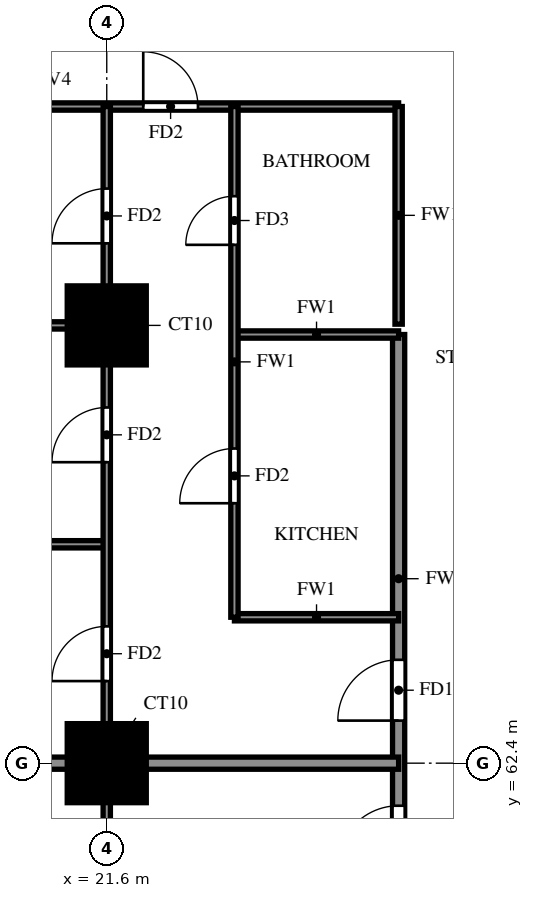
"""IFC4 building model, lengths in metres.
Left out: names, types, materials, properties, quantities, classifications, styles, units other than length and angle.
Written with IfcOpenShell. Run it as: python <this file> out.ifc"""

import sys

from ifc_helpers import new_model, si_unit, direction, frame, frame_2d, origin, origin_2d, place, context, subcontext, project, spatial, rectangle, extrude, source, transform, mapped, element, fill, save


model = new_model("IFC4")
c1 = context("Model", 3, precision=1e-05, world=origin(), true_north=direction((0.0, 1.0)))
c2 = subcontext(c1, "Body", "Model", "MODEL_VIEW")
j1 = project(units=[si_unit("LENGTHUNIT", "METRE"), si_unit("PLANEANGLEUNIT", "RADIAN")], contexts=[c1])
p1 = place(None, origin())
s1 = spatial("IfcSite", under=j1, at=p1, CompositionType="ELEMENT")
p2 = place(p1, origin())
s2 = spatial("IfcBuilding", under=s1, at=p2, CompositionType="ELEMENT")
p3 = place(p2, frame((0.0, 0.0, 79.5)))
s3 = spatial("IfcBuildingStorey", under=s2, at=p3, CompositionType="ELEMENT", Elevation=79.5)
m1 = source(origin(), c2, "Body", "SweptSolid", [
    extrude(rectangle(XDim=1.3, YDim=1.3, at=origin_2d()), origin(), (0.0, 0.0, 1.0), 3.18),
])
for number, where, z_axis, x_axis in (
    (1, (21.6, 62.4, 0.0), (0.0, 0.0, 1.0), (1.0, 0.0, 0.0)),
    (2, (21.6, 69.6, 0.0), (0.0, 0.0, 1.0), (1.0, 0.0, 0.0)),
):
    element("IfcColumn", number, at=place(p3, frame(where, z_axis=z_axis, x_axis=x_axis)), inside=s3, PredefinedType="COLUMN", context=c2, shape_type="MappedRepresentation", body=[
        mapped(m1, transform((0.0, 0.0, 0.0))),
    ])
p4 = place(p3, frame((26.4, 60.0, 0.0), z_axis=(0.0, 0.0, 1.0), x_axis=(0.0, 1.0, 0.0)))
e3 = element("IfcWall", 3, at=p4, inside=s3, PredefinedType="SOLIDWALL", context=c2, shape_type="SweptSolid", body=[
    extrude(rectangle(XDim=9.45, YDim=0.2, at=frame_2d((4.725, 0.0))), origin(), (0.0, 0.0, 1.0), 3.18),
])
p5 = place(p4, frame((0.7, 0.0, 0.0)))
e4 = element("IfcOpeningElement", 4, at=p5, cuts=e3, PredefinedType="OPENING", context=c2, shape_type="SweptSolid", body=[
    extrude(rectangle(XDim=1.0, YDim=2.1, at=frame_2d((0.5, 1.05))), frame((0.0, 0.11, 0.0), z_axis=(0.0, -1.0, 0.0), x_axis=(1.0, 0.0, 0.0)), (0.0, 0.0, 1.0), 0.22),
])
p6 = place(p4, frame((3.1, 0.0, 0.0)))
e5 = element("IfcOpeningElement", 5, at=p6, cuts=e3, PredefinedType="OPENING", context=c2, shape_type="SweptSolid", body=[
    extrude(rectangle(XDim=1.0, YDim=2.1, at=frame_2d((0.5, 1.05))), frame((0.0, 0.11, 0.0), z_axis=(0.0, -1.0, 0.0), x_axis=(1.0, 0.0, 0.0)), (0.0, 0.0, 1.0), 0.22),
])
p7 = place(p3, frame((14.525, 62.4, 0.0), z_axis=(0.0, 0.0, 1.0), x_axis=(1.0, 0.0, 0.0)))
e6 = element("IfcWall", 6, at=p7, inside=s3, PredefinedType="SOLIDWALL", context=c2, shape_type="SweptSolid", body=[
    extrude(rectangle(XDim=11.875, YDim=0.2, at=frame_2d((5.938, 0.0))), origin(), (0.0, 0.0, 1.0), 3.18),
])
p8 = place(p3, frame((23.7, 64.8, 0.0), z_axis=(0.0, 0.0, 1.0), x_axis=(1.0, 0.0, 0.0)))
e7 = element("IfcWall", 7, at=p8, inside=s3, PredefinedType="PARTITIONING", context=c2, shape_type="SweptSolid", body=[
    extrude(rectangle(XDim=2.7, YDim=0.12, at=frame_2d((1.35, 0.0))), origin(), (0.0, 0.0, 1.0), 3.18),
])
p9 = place(p3, frame((14.525, 66.0, 0.0), z_axis=(0.0, 0.0, 1.0), x_axis=(1.0, 0.0, 0.0)))
e8 = element("IfcWall", 8, at=p9, inside=s3, PredefinedType="PARTITIONING", context=c2, shape_type="SweptSolid", body=[
    extrude(rectangle(XDim=7.075, YDim=0.12, at=frame_2d((3.538, 0.0))), origin(), (0.0, 0.0, 1.0), 2.28),
])
p10 = place(p3, frame((23.7, 69.45, 0.0), z_axis=(0.0, 0.0, 1.0), x_axis=(1.0, 0.0, 0.0)))
e9 = element("IfcWall", 9, at=p10, inside=s3, PredefinedType="PARTITIONING", context=c2, shape_type="SweptSolid", body=[
    extrude(rectangle(XDim=2.7, YDim=0.12, at=frame_2d((1.35, 0.0))), origin(), (0.0, 0.0, 1.0), 3.18),
])
p11 = place(p3, frame((14.525, 69.6, 0.0), z_axis=(0.0, 0.0, 1.0), x_axis=(1.0, 0.0, 0.0)))
e10 = element("IfcWall", 10, at=p11, inside=s3, PredefinedType="PARTITIONING", context=c2, shape_type="SweptSolid", body=[
    extrude(rectangle(XDim=7.075, YDim=0.12, at=frame_2d((3.538, 0.0))), origin(), (0.0, 0.0, 1.0), 3.18),
])
p12 = place(p3, frame((14.525, 73.2, 0.0), z_axis=(0.0, 0.0, 1.0), x_axis=(1.0, 0.0, 0.0)))
e11 = element("IfcWall", 11, at=p12, inside=s3, PredefinedType="PARTITIONING", context=c2, shape_type="SweptSolid", body=[
    extrude(rectangle(XDim=11.875, YDim=0.12, at=frame_2d((5.938, 0.0))), origin(), (0.0, 0.0, 1.0), 2.28),
])
p13 = place(p12, frame((7.675, 0.0, 0.0)))
e12 = element("IfcOpeningElement", 12, at=p13, cuts=e11, PredefinedType="OPENING", context=c2, shape_type="SweptSolid", body=[
    extrude(rectangle(XDim=0.9, YDim=2.1, at=frame_2d((0.45, 1.05))), frame((0.0, 0.07, 0.0), z_axis=(0.0, -1.0, 0.0), x_axis=(1.0, 0.0, 0.0)), (0.0, 0.0, 1.0), 0.14),
])
p14 = place(p3, frame((21.6, 33.725, 0.0), z_axis=(0.0, 0.0, 1.0), x_axis=(0.0, 1.0, 0.0)))
e13 = element("IfcWall", 13, at=p14, inside=s3, PredefinedType="PARTITIONING", context=c2, shape_type="SweptSolid", body=[
    extrude(rectangle(XDim=39.475, YDim=0.12, at=frame_2d((19.737, 0.0))), origin(), (0.0, 0.0, 1.0), 3.18),
])
p15 = place(p14, frame((7.775, 0.0, 0.0)))
e14 = element("IfcOpeningElement", 14, at=p15, cuts=e13, PredefinedType="OPENING", context=c2, shape_type="SweptSolid", body=[
    extrude(rectangle(XDim=0.9, YDim=2.1, at=frame_2d((0.45, 1.05))), frame((0.0, 0.07, 0.0), z_axis=(0.0, -1.0, 0.0), x_axis=(1.0, 0.0, 0.0)), (0.0, 0.0, 1.0), 0.14),
])
p16 = place(p14, frame((17.125, 0.0, 0.0)))
e15 = element("IfcOpeningElement", 15, at=p16, cuts=e13, PredefinedType="OPENING", context=c2, shape_type="SweptSolid", body=[
    extrude(rectangle(XDim=1.5, YDim=2.1, at=frame_2d((0.75, 1.05))), frame((0.0, 0.07, 0.0), z_axis=(0.0, -1.0, 0.0), x_axis=(1.0, 0.0, 0.0)), (0.0, 0.0, 1.0), 0.14),
])
p17 = place(p14, frame((22.825, 0.0, 0.0)))
e16 = element("IfcOpeningElement", 16, at=p17, cuts=e13, PredefinedType="OPENING", context=c2, shape_type="SweptSolid", body=[
    extrude(rectangle(XDim=0.9, YDim=2.1, at=frame_2d((0.45, 1.05))), frame((0.0, 0.07, 0.0), z_axis=(0.0, -1.0, 0.0), x_axis=(1.0, 0.0, 0.0)), (0.0, 0.0, 1.0), 0.14),
])
p18 = place(p14, frame((26.425, 0.0, 0.0)))
e17 = element("IfcOpeningElement", 17, at=p18, cuts=e13, PredefinedType="OPENING", context=c2, shape_type="SweptSolid", body=[
    extrude(rectangle(XDim=0.9, YDim=2.1, at=frame_2d((0.45, 1.05))), frame((0.0, 0.07, 0.0), z_axis=(0.0, -1.0, 0.0), x_axis=(1.0, 0.0, 0.0)), (0.0, 0.0, 1.0), 0.14),
])
p19 = place(p14, frame((30.025, 0.0, 0.0)))
e18 = element("IfcOpeningElement", 18, at=p19, cuts=e13, PredefinedType="OPENING", context=c2, shape_type="SweptSolid", body=[
    extrude(rectangle(XDim=0.9, YDim=2.1, at=frame_2d((0.45, 1.05))), frame((0.0, 0.07, 0.0), z_axis=(0.0, -1.0, 0.0), x_axis=(1.0, 0.0, 0.0)), (0.0, 0.0, 1.0), 0.14),
])
p20 = place(p14, frame((33.625, 0.0, 0.0)))
e19 = element("IfcOpeningElement", 19, at=p20, cuts=e13, PredefinedType="OPENING", context=c2, shape_type="SweptSolid", body=[
    extrude(rectangle(XDim=0.9, YDim=2.1, at=frame_2d((0.45, 1.05))), frame((0.0, 0.07, 0.0), z_axis=(0.0, -1.0, 0.0), x_axis=(1.0, 0.0, 0.0)), (0.0, 0.0, 1.0), 0.14),
])
p21 = place(p14, frame((37.225, 0.0, 0.0)))
e20 = element("IfcOpeningElement", 20, at=p21, cuts=e13, PredefinedType="OPENING", context=c2, shape_type="SweptSolid", body=[
    extrude(rectangle(XDim=0.9, YDim=2.1, at=frame_2d((0.45, 1.05))), frame((0.0, 0.07, 0.0), z_axis=(0.0, -1.0, 0.0), x_axis=(1.0, 0.0, 0.0)), (0.0, 0.0, 1.0), 0.14),
])
p22 = place(p3, frame((23.7, 64.8, 0.0), z_axis=(0.0, 0.0, 1.0), x_axis=(0.0, 1.0, 0.0)))
e21 = element("IfcWall", 21, at=p22, inside=s3, PredefinedType="PARTITIONING", context=c2, shape_type="SweptSolid", body=[
    extrude(rectangle(XDim=8.4, YDim=0.12, at=frame_2d((4.2, 0.0))), origin(), (0.0, 0.0, 1.0), 3.18),
])
p23 = place(p22, frame((1.875, 0.0, 0.0)))
e22 = element("IfcOpeningElement", 22, at=p23, cuts=e21, PredefinedType="OPENING", context=c2, shape_type="SweptSolid", body=[
    extrude(rectangle(XDim=0.9, YDim=2.1, at=frame_2d((0.45, 1.05))), frame((0.0, 0.07, 0.0), z_axis=(0.0, -1.0, 0.0), x_axis=(1.0, 0.0, 0.0)), (0.0, 0.0, 1.0), 0.14),
])
p24 = place(p22, frame((6.125, 0.0, 0.0)))
e23 = element("IfcOpeningElement", 23, at=p24, cuts=e21, PredefinedType="OPENING", context=c2, shape_type="SweptSolid", body=[
    extrude(rectangle(XDim=0.8, YDim=2.1, at=frame_2d((0.4, 1.05))), frame((0.0, 0.07, 0.0), z_axis=(0.0, -1.0, 0.0), x_axis=(1.0, 0.0, 0.0)), (0.0, 0.0, 1.0), 0.14),
])
p25 = place(p3, frame((26.4, 69.62, 0.0), z_axis=(0.0, 0.0, 1.0), x_axis=(0.0, 1.0, 0.0)))
e24 = element("IfcWall", 24, at=p25, inside=s3, PredefinedType="PARTITIONING", context=c2, shape_type="SweptSolid", body=[
    extrude(rectangle(XDim=3.58, YDim=0.12, at=frame_2d((1.79, 0.0))), origin(), (0.0, 0.0, 1.0), 3.18),
])
p26 = place(p5, origin())
e25 = element("IfcDoor", 25, at=p26, inside=s3, OperationType="SINGLE_SWING_LEFT", PredefinedType="DOOR", context=c2, shape_type="SweptSolid", body=[
    extrude(rectangle(XDim=1.0, YDim=2.1, at=frame_2d((0.5, 1.05))), frame((0.0, 0.025, 0.0), z_axis=(0.0, -1.0, 0.0), x_axis=(1.0, 0.0, 0.0)), (0.0, 0.0, 1.0), 0.05),
])
fill(e4, e25)
p27 = place(p6, origin())
e26 = element("IfcDoor", 26, at=p27, inside=s3, OperationType="SINGLE_SWING_RIGHT", PredefinedType="DOOR", context=c2, shape_type="SweptSolid", body=[
    extrude(rectangle(XDim=1.0, YDim=2.1, at=frame_2d((0.5, 1.05))), frame((0.0, 0.025, 0.0), z_axis=(0.0, -1.0, 0.0), x_axis=(1.0, 0.0, 0.0)), (0.0, 0.0, 1.0), 0.05),
])
fill(e5, e26)
p28 = place(p19, origin())
e27 = element("IfcDoor", 27, at=p28, inside=s3, OperationType="SINGLE_SWING_LEFT", PredefinedType="DOOR", context=c2, shape_type="SweptSolid", body=[
    extrude(rectangle(XDim=0.9, YDim=2.1, at=frame_2d((0.45, 1.05))), frame((0.0, 0.025, 0.0), z_axis=(0.0, -1.0, 0.0), x_axis=(1.0, 0.0, 0.0)), (0.0, 0.0, 1.0), 0.05),
])
fill(e18, e27)
p29 = place(p20, origin())
e28 = element("IfcDoor", 28, at=p29, inside=s3, OperationType="SINGLE_SWING_LEFT", PredefinedType="DOOR", context=c2, shape_type="SweptSolid", body=[
    extrude(rectangle(XDim=0.9, YDim=2.1, at=frame_2d((0.45, 1.05))), frame((0.0, 0.025, 0.0), z_axis=(0.0, -1.0, 0.0), x_axis=(1.0, 0.0, 0.0)), (0.0, 0.0, 1.0), 0.05),
])
fill(e19, e28)
p30 = place(p21, origin())
e29 = element("IfcDoor", 29, at=p30, inside=s3, OperationType="SINGLE_SWING_RIGHT", PredefinedType="DOOR", context=c2, shape_type="SweptSolid", body=[
    extrude(rectangle(XDim=0.9, YDim=2.1, at=frame_2d((0.45, 1.05))), frame((0.0, 0.025, 0.0), z_axis=(0.0, -1.0, 0.0), x_axis=(1.0, 0.0, 0.0)), (0.0, 0.0, 1.0), 0.05),
])
fill(e20, e29)
p31 = place(p13, origin())
e30 = element("IfcDoor", 30, at=p31, inside=s3, OperationType="SINGLE_SWING_LEFT", PredefinedType="DOOR", context=c2, shape_type="SweptSolid", body=[
    extrude(rectangle(XDim=0.9, YDim=2.1, at=frame_2d((0.45, 1.05))), frame((0.0, 0.025, 0.0), z_axis=(0.0, -1.0, 0.0), x_axis=(1.0, 0.0, 0.0)), (0.0, 0.0, 1.0), 0.05),
])
fill(e12, e30)
p32 = place(p23, origin())
e31 = element("IfcDoor", 31, at=p32, inside=s3, OperationType="SINGLE_SWING_LEFT", PredefinedType="DOOR", context=c2, shape_type="SweptSolid", body=[
    extrude(rectangle(XDim=0.9, YDim=2.1, at=frame_2d((0.45, 1.05))), frame((0.0, 0.025, 0.0), z_axis=(0.0, -1.0, 0.0), x_axis=(1.0, 0.0, 0.0)), (0.0, 0.0, 1.0), 0.05),
])
fill(e22, e31)
p33 = place(p24, origin())
e32 = element("IfcDoor", 32, at=p33, inside=s3, OperationType="SINGLE_SWING_RIGHT", PredefinedType="DOOR", context=c2, shape_type="SweptSolid", body=[
    extrude(rectangle(XDim=0.8, YDim=2.1, at=frame_2d((0.4, 1.05))), frame((0.0, 0.025, 0.0), z_axis=(0.0, -1.0, 0.0), x_axis=(1.0, 0.0, 0.0)), (0.0, 0.0, 1.0), 0.05),
])
fill(e23, e32)
save(model, sys.argv[1])
